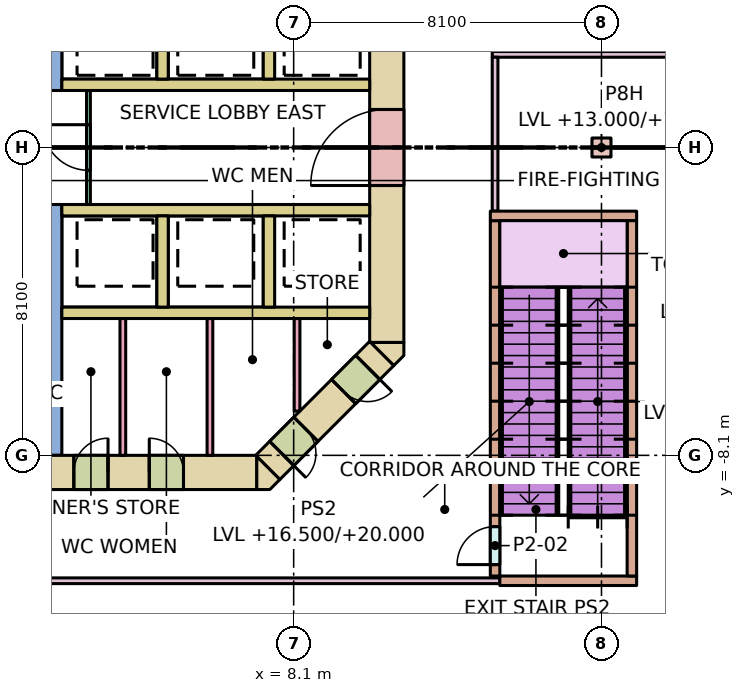
"""IFC4 building model, lengths in metres.
Left out: names, types, materials, properties, quantities, classifications, styles, units other than length and angle.
Written with IfcOpenShell. Run it as: python <this file> out.ifc"""

import sys

from ifc_helpers import new_model, si_unit, direction, frame, frame_2d, origin, origin_2d, place, context, subcontext, project, spatial, polyline, rectangle, outline, extrude, element, fill, save


model = new_model("IFC4")
c1 = context("Model", 3, precision=1e-05, world=origin(), true_north=direction((0.0, 1.0)))
c2 = subcontext(c1, "Body", "Model", "MODEL_VIEW")
j1 = project(units=[si_unit("LENGTHUNIT", "METRE"), si_unit("PLANEANGLEUNIT", "RADIAN")], contexts=[c1])
p1 = place(None, origin())
s1 = spatial("IfcSite", under=j1, at=p1, CompositionType="ELEMENT")
p2 = place(p1, origin())
s2 = spatial("IfcBuilding", under=s1, at=p2, CompositionType="ELEMENT")
p3 = place(p2, frame((0.0, 0.0, 13.0)))
s3 = spatial("IfcBuildingStorey", under=s2, at=p3, CompositionType="ELEMENT", Elevation=13.0)
p4 = place(p3, frame((16.2, 0.0, 0.0), z_axis=(0.0, 0.0, 1.0), x_axis=(1.0, 0.0, 0.0)))
e1 = element("IfcColumn", 1, at=p4, inside=s3, PredefinedType="COLUMN", context=c2, shape_type="SweptSolid", body=[
    extrude(rectangle(XDim=0.5, YDim=0.5, at=origin_2d()), origin(), (0.0, 0.0, 1.0), 5.0),
])
p5 = place(p3, frame((-7.13, -8.55, -0.32), z_axis=(0.0, 0.0, 1.0), x_axis=(1.0, 0.0, 0.0)))
e2 = element("IfcWall", 2, at=p5, inside=s3, PredefinedType="SHEAR", context=c2, shape_type="SweptSolid", body=[
    extrude(rectangle(XDim=14.26, YDim=0.9, at=frame_2d((7.13, 0.0))), origin(), (0.0, 0.0, 1.0), 7.0),
])
p6 = place(p5, frame((8.08, 0.0, 0.32)))
e3 = element("IfcOpeningElement", 3, at=p6, cuts=e2, PredefinedType="OPENING", context=c2, shape_type="SweptSolid", body=[
    extrude(rectangle(XDim=0.7, YDim=2.1, at=frame_2d((0.35, 1.05))), frame((0.0, 0.46, 0.0), z_axis=(0.0, -1.0, 0.0), x_axis=(1.0, 0.0, 0.0)), (0.0, 0.0, 1.0), 0.92),
])
p7 = place(p5, frame((5.58, 0.0, 0.32)))
e4 = element("IfcOpeningElement", 4, at=p7, cuts=e2, PredefinedType="OPENING", context=c2, shape_type="SweptSolid", body=[
    extrude(rectangle(XDim=0.85, YDim=2.1, at=frame_2d((0.425, 1.05))), frame((0.0, 0.46, 0.0), z_axis=(0.0, -1.0, 0.0), x_axis=(1.0, 0.0, 0.0)), (0.0, 0.0, 1.0), 0.92),
])
p8 = place(p5, frame((6.88, 0.0, 0.32)))
e5 = element("IfcOpeningElement", 5, at=p8, cuts=e2, PredefinedType="OPENING", context=c2, shape_type="SweptSolid", body=[
    extrude(rectangle(XDim=0.85, YDim=2.1, at=frame_2d((0.425, 1.05))), frame((0.0, 0.46, 0.0), z_axis=(0.0, -1.0, 0.0), x_axis=(1.0, 0.0, 0.0)), (0.0, 0.0, 1.0), 0.92),
])
p9 = place(p5, frame((9.445, 0.0, 0.32)))
e6 = element("IfcOpeningElement", 6, at=p9, cuts=e2, PredefinedType="OPENING", context=c2, shape_type="SweptSolid", body=[
    extrude(rectangle(XDim=0.9, YDim=2.1, at=frame_2d((0.45, 1.05))), frame((0.0, 0.46, 0.0), z_axis=(0.0, -1.0, 0.0), x_axis=(1.0, 0.0, 0.0)), (0.0, 0.0, 1.0), 0.92),
])
p10 = place(p5, frame((11.431, 0.0, 0.32)))
e7 = element("IfcOpeningElement", 7, at=p10, cuts=e2, PredefinedType="OPENING", context=c2, shape_type="SweptSolid", body=[
    extrude(rectangle(XDim=0.9, YDim=2.1, at=frame_2d((0.45, 1.05))), frame((0.0, 0.46, 0.0), z_axis=(0.0, -1.0, 0.0), x_axis=(1.0, 0.0, 0.0)), (0.0, 0.0, 1.0), 0.92),
])
p11 = place(p3, frame((10.55, -5.13, -0.32), z_axis=(0.0, 0.0, 1.0), x_axis=(0.0, 1.0, 0.0)))
e8 = element("IfcWall", 8, at=p11, inside=s3, PredefinedType="SHEAR", context=c2, shape_type="SweptSolid", body=[
    extrude(rectangle(XDim=10.26, YDim=0.9, at=frame_2d((5.13, 0.0))), origin(), (0.0, 0.0, 1.0), 7.0),
])
p12 = place(p11, frame((4.13, 0.0, 0.32)))
e9 = element("IfcOpeningElement", 9, at=p12, cuts=e8, PredefinedType="OPENING", context=c2, shape_type="SweptSolid", body=[
    extrude(rectangle(XDim=2.0, YDim=2.1, at=frame_2d((1.0, 1.05))), frame((0.0, 0.46, 0.0), z_axis=(0.0, -1.0, 0.0), x_axis=(1.0, 0.0, 0.0)), (0.0, 0.0, 1.0), 0.92),
])
p13 = place(p3, frame((10.418, -5.418, -0.32), z_axis=(0.0, 0.0, 1.0), x_axis=(-0.707106781187, -0.707106781187, 0.0)))
e10 = element("IfcWall", 10, at=p13, inside=s3, PredefinedType="SHEAR", context=c2, shape_type="SweptSolid", body=[
    extrude(rectangle(XDim=4.243, YDim=0.9, at=frame_2d((2.121, 0.0))), origin(), (0.0, 0.0, 1.0), 7.0),
])
p14 = place(p13, frame((2.823, 0.0, 0.32)))
e11 = element("IfcOpeningElement", 11, at=p14, cuts=e10, PredefinedType="OPENING", context=c2, shape_type="SweptSolid", body=[
    extrude(rectangle(XDim=0.9, YDim=2.1, at=frame_2d((0.45, 1.05))), frame((0.0, 0.46, 0.0), z_axis=(0.0, -1.0, 0.0), x_axis=(1.0, 0.0, 0.0)), (0.0, 0.0, 1.0), 0.92),
])
p15 = place(p13, frame((0.52, 0.0, 0.32)))
e12 = element("IfcOpeningElement", 12, at=p15, cuts=e10, PredefinedType="OPENING", context=c2, shape_type="SweptSolid", body=[
    extrude(rectangle(XDim=0.9, YDim=2.1, at=frame_2d((0.45, 1.05))), frame((0.0, 0.46, 0.0), z_axis=(0.0, -1.0, 0.0), x_axis=(1.0, 0.0, 0.0)), (0.0, 0.0, 1.0), 0.92),
])
p16 = place(p3, frame((0.0, 0.0, -0.32)))
e13 = element("IfcWall", 13, at=p16, inside=s3, PredefinedType="SHEAR", context=c2, shape_type="SweptSolid", body=[
    extrude(outline(polyline([(7.473, -9.0), (7.13, -9.0), (7.13, -8.13), (7.736, -8.736), (7.473, -9.0)])), origin(), (0.0, 0.0, 1.0), 7.0),
])
p17 = place(p3, frame((0.0, 0.0, -0.32)))
e14 = element("IfcWall", 14, at=p17, inside=s3, PredefinedType="SHEAR", context=c2, shape_type="SweptSolid", body=[
    extrude(outline(polyline([(11.0, -5.473), (10.736, -5.736), (10.13, -5.13), (11.0, -5.13), (11.0, -5.473)])), origin(), (0.0, 0.0, 1.0), 7.0),
])
for number, where, z_axis, x_axis in (
    (15, (2.0, -4.35, 0.0), (0.0, 0.0, 1.0), (1.0, 0.0, 0.0)),
    (16, (2.0, 1.65, 0.0), (0.0, 0.0, 1.0), (1.0, 0.0, 0.0)),
    (17, (2.0, -1.65, 0.0), (0.0, 0.0, 1.0), (1.0, 0.0, 0.0)),
):
    element("IfcWall", number, at=place(p3, frame(where, z_axis=z_axis, x_axis=x_axis)), inside=s3, PredefinedType="SOLIDWALL", context=c2, shape_type="SweptSolid", body=[
        extrude(rectangle(XDim=8.1, YDim=0.3, at=frame_2d((4.05, 0.0))), origin(), (0.0, 0.0, 1.0), 6.68),
    ])
for number, where, z_axis, x_axis in (
    (18, (4.65, 1.8, 0.0), (0.0, 0.0, 1.0), (0.0, 1.0, 0.0)),
    (19, (4.65, -4.2, 0.0), (0.0, 0.0, 1.0), (0.0, 1.0, 0.0)),
    (20, (7.45, 1.8, 0.0), (0.0, 0.0, 1.0), (0.0, 1.0, 0.0)),
    (21, (7.45, -4.2, 0.0), (0.0, 0.0, 1.0), (0.0, 1.0, 0.0)),
):
    element("IfcWall", number, at=place(p3, frame(where, z_axis=z_axis, x_axis=x_axis)), inside=s3, PredefinedType="SOLIDWALL", context=c2, shape_type="SweptSolid", body=[
        extrude(rectangle(XDim=2.4, YDim=0.3, at=frame_2d((1.2, 0.0))), origin(), (0.0, 0.0, 1.0), 6.68),
    ])
for number, where, z_axis, x_axis in (
    (22, (1.85, 1.5, 0.0), (0.0, 0.0, 1.0), (0.0, 1.0, 0.0)),
    (23, (1.85, -8.1, 0.0), (0.0, 0.0, 1.0), (0.0, 1.0, 0.0)),
):
    element("IfcWall", number, at=place(p3, frame(where, z_axis=z_axis, x_axis=x_axis)), inside=s3, PredefinedType="SHEAR", context=c2, shape_type="SweptSolid", body=[
        extrude(rectangle(XDim=6.6, YDim=0.3, at=frame_2d((3.3, 0.0))), origin(), (0.0, 0.0, 1.0), 6.68),
    ])
p18 = place(p3, frame((2.7, -1.5, 0.0), z_axis=(0.0, 0.0, 1.0), x_axis=(0.0, 1.0, 0.0)))
e24 = element("IfcWall", 24, at=p18, inside=s3, PredefinedType="PARTITIONING", context=c2, shape_type="SweptSolid", body=[
    extrude(rectangle(XDim=3.0, YDim=0.1, at=frame_2d((1.5, 0.0))), origin(), (0.0, 0.0, 1.0), 6.68),
])
p19 = place(p18, frame((0.9, 0.0, 0.0)))
e25 = element("IfcOpeningElement", 25, at=p19, cuts=e24, PredefinedType="OPENING", context=c2, shape_type="SweptSolid", body=[
    extrude(rectangle(XDim=1.2, YDim=2.1, at=frame_2d((0.6, 1.05))), frame((0.0, 0.06, 0.0), z_axis=(0.0, -1.0, 0.0), x_axis=(1.0, 0.0, 0.0)), (0.0, 0.0, 1.0), 0.12),
])
for number, where, z_axis, x_axis in (
    (26, (3.605, -8.1, 0.0), (0.0, 0.0, 1.0), (0.0, 1.0, 0.0)),
    (27, (5.897, -8.1, 0.0), (0.0, 0.0, 1.0), (0.0, 1.0, 0.0)),
):
    element("IfcWall", number, at=place(p3, frame(where, z_axis=z_axis, x_axis=x_axis)), inside=s3, PredefinedType="PARTITIONING", context=c2, shape_type="SweptSolid", body=[
        extrude(rectangle(XDim=3.6, YDim=0.15, at=frame_2d((1.8, 0.0))), origin(), (0.0, 0.0, 1.0), 6.68),
    ])
p20 = place(p3, frame((8.189, -6.936, 0.0), z_axis=(0.0, 0.0, 1.0), x_axis=(0.0, 1.0, 0.0)))
e28 = element("IfcWall", 28, at=p20, inside=s3, PredefinedType="PARTITIONING", context=c2, shape_type="SweptSolid", body=[
    extrude(rectangle(XDim=2.436, YDim=0.15, at=frame_2d((1.218, 0.0))), origin(), (0.0, 0.0, 1.0), 6.68),
])
p21 = place(p3, frame((13.325, 2.45, 0.0), z_axis=(0.0, 0.0, 1.0), x_axis=(1.0, 0.0, 0.0)))
e29 = element("IfcWall", 29, at=p21, inside=s3, PredefinedType="PARTITIONING", context=c2, shape_type="SweptSolid", body=[
    extrude(rectangle(XDim=13.38, YDim=0.15, at=frame_2d((6.69, 0.0))), origin(), (0.0, 0.0, 1.0), 5.0),
])
p22 = place(p3, frame((13.4, -11.275, 0.0), z_axis=(0.0, 0.0, 1.0), x_axis=(0.0, 1.0, 0.0)))
e30 = element("IfcWall", 30, at=p22, inside=s3, PredefinedType="STANDARD", context=c2, shape_type="SweptSolid", body=[
    extrude(rectangle(XDim=9.35, YDim=0.25, at=frame_2d((4.675, 0.0))), origin(), (0.0, 0.0, 1.0), 5.0),
])
p23 = place(p22, frame((0.3, 0.0, 0.0)))
e31 = element("IfcOpeningElement", 31, at=p23, cuts=e30, PredefinedType="OPENING", context=c2, shape_type="SweptSolid", body=[
    extrude(rectangle(XDim=1.0, YDim=2.1, at=frame_2d((0.5, 1.05))), frame((0.0, 0.135, 0.0), z_axis=(0.0, -1.0, 0.0), x_axis=(1.0, 0.0, 0.0)), (0.0, 0.0, 1.0), 0.27),
])
p24 = place(p3, frame((13.525, -11.4, 0.0), z_axis=(0.0, 0.0, 1.0), x_axis=(1.0, 0.0, 0.0)))
e32 = element("IfcWall", 32, at=p24, inside=s3, PredefinedType="STANDARD", context=c2, shape_type="SweptSolid", body=[
    extrude(rectangle(XDim=3.6, YDim=0.25, at=frame_2d((1.8, 0.0))), origin(), (0.0, 0.0, 1.0), 5.0),
])
p25 = place(p3, frame((13.275, -1.8, 0.0), z_axis=(0.0, 0.0, 1.0), x_axis=(1.0, 0.0, 0.0)))
e33 = element("IfcWall", 33, at=p25, inside=s3, PredefinedType="STANDARD", context=c2, shape_type="SweptSolid", body=[
    extrude(rectangle(XDim=3.85, YDim=0.25, at=frame_2d((1.925, 0.0))), origin(), (0.0, 0.0, 1.0), 5.0),
])
p26 = place(p3, frame((17.0, -11.275, 0.0), z_axis=(0.0, 0.0, 1.0), x_axis=(0.0, 1.0, 0.0)))
e34 = element("IfcWall", 34, at=p26, inside=s3, PredefinedType="STANDARD", context=c2, shape_type="SweptSolid", body=[
    extrude(rectangle(XDim=9.35, YDim=0.25, at=frame_2d((4.675, 0.0))), origin(), (0.0, 0.0, 1.0), 5.0),
])
p27 = place(p3, frame((-2.525, -11.4, 0.0), z_axis=(0.0, 0.0, 1.0), x_axis=(1.0, 0.0, 0.0)))
e35 = element("IfcWall", 35, at=p27, inside=s3, PredefinedType="PARTITIONING", context=c2, shape_type="SweptSolid", body=[
    extrude(rectangle(XDim=16.05, YDim=0.15, at=frame_2d((8.025, 0.0))), origin(), (0.0, 0.0, 1.0), 5.0),
])
p28 = place(p3, frame((13.4, -1.675, 0.0), z_axis=(0.0, 0.0, 1.0), x_axis=(0.0, 1.0, 0.0)))
e36 = element("IfcWall", 36, at=p28, inside=s3, PredefinedType="PARTITIONING", context=c2, shape_type="SweptSolid", body=[
    extrude(rectangle(XDim=4.05, YDim=0.15, at=frame_2d((2.025, 0.0))), origin(), (0.0, 0.0, 1.0), 5.0),
])
p29 = place(p12, origin())
e37 = element("IfcDoor", 37, at=p29, inside=s3, OperationType="DOUBLE_DOOR_SINGLE_SWING", PredefinedType="DOOR", context=c2, shape_type="SweptSolid", body=[
    extrude(rectangle(XDim=2.0, YDim=2.1, at=frame_2d((1.0, 1.05))), frame((0.0, 0.025, 0.0), z_axis=(0.0, -1.0, 0.0), x_axis=(1.0, 0.0, 0.0)), (0.0, 0.0, 1.0), 0.05),
])
fill(e9, e37)
p30 = place(p19, origin())
e38 = element("IfcDoor", 38, at=p30, inside=s3, OperationType="SINGLE_SWING_RIGHT", PredefinedType="DOOR", context=c2, shape_type="SweptSolid", body=[
    extrude(rectangle(XDim=1.2, YDim=2.1, at=frame_2d((0.6, 1.05))), frame((0.0, 0.025, 0.0), z_axis=(0.0, -1.0, 0.0), x_axis=(1.0, 0.0, 0.0)), (0.0, 0.0, 1.0), 0.05),
])
fill(e25, e38)
p31 = place(p9, origin())
e39 = element("IfcDoor", 39, at=p31, inside=s3, OperationType="SINGLE_SWING_RIGHT", PredefinedType="DOOR", context=c2, shape_type="SweptSolid", body=[
    extrude(rectangle(XDim=0.9, YDim=2.1, at=frame_2d((0.45, 1.05))), frame((0.0, 0.025, 0.0), z_axis=(0.0, -1.0, 0.0), x_axis=(1.0, 0.0, 0.0)), (0.0, 0.0, 1.0), 0.05),
])
fill(e6, e39)
p32 = place(p10, origin())
e40 = element("IfcDoor", 40, at=p32, inside=s3, OperationType="SINGLE_SWING_LEFT", PredefinedType="DOOR", context=c2, shape_type="SweptSolid", body=[
    extrude(rectangle(XDim=0.9, YDim=2.1, at=frame_2d((0.45, 1.05))), frame((0.0, 0.025, 0.0), z_axis=(0.0, -1.0, 0.0), x_axis=(1.0, 0.0, 0.0)), (0.0, 0.0, 1.0), 0.05),
])
fill(e7, e40)
p33 = place(p14, origin())
e41 = element("IfcDoor", 41, at=p33, inside=s3, OperationType="SINGLE_SWING_RIGHT", PredefinedType="DOOR", context=c2, shape_type="SweptSolid", body=[
    extrude(rectangle(XDim=0.9, YDim=2.1, at=frame_2d((0.45, 1.05))), frame((0.0, 0.025, 0.0), z_axis=(0.0, -1.0, 0.0), x_axis=(1.0, 0.0, 0.0)), (0.0, 0.0, 1.0), 0.05),
])
fill(e11, e41)
p34 = place(p15, origin())
e42 = element("IfcDoor", 42, at=p34, inside=s3, OperationType="SINGLE_SWING_LEFT", PredefinedType="DOOR", context=c2, shape_type="SweptSolid", body=[
    extrude(rectangle(XDim=0.9, YDim=2.1, at=frame_2d((0.45, 1.05))), frame((0.0, 0.025, 0.0), z_axis=(0.0, -1.0, 0.0), x_axis=(1.0, 0.0, 0.0)), (0.0, 0.0, 1.0), 0.05),
])
fill(e12, e42)
p35 = place(p23, origin())
e43 = element("IfcDoor", 43, at=p35, inside=s3, OperationType="SINGLE_SWING_LEFT", PredefinedType="DOOR", context=c2, shape_type="SweptSolid", body=[
    extrude(rectangle(XDim=1.0, YDim=2.1, at=frame_2d((0.5, 1.05))), frame((0.0, 0.025, 0.0), z_axis=(0.0, -1.0, 0.0), x_axis=(1.0, 0.0, 0.0)), (0.0, 0.0, 1.0), 0.05),
])
fill(e31, e43)
save(model, sys.argv[1])
